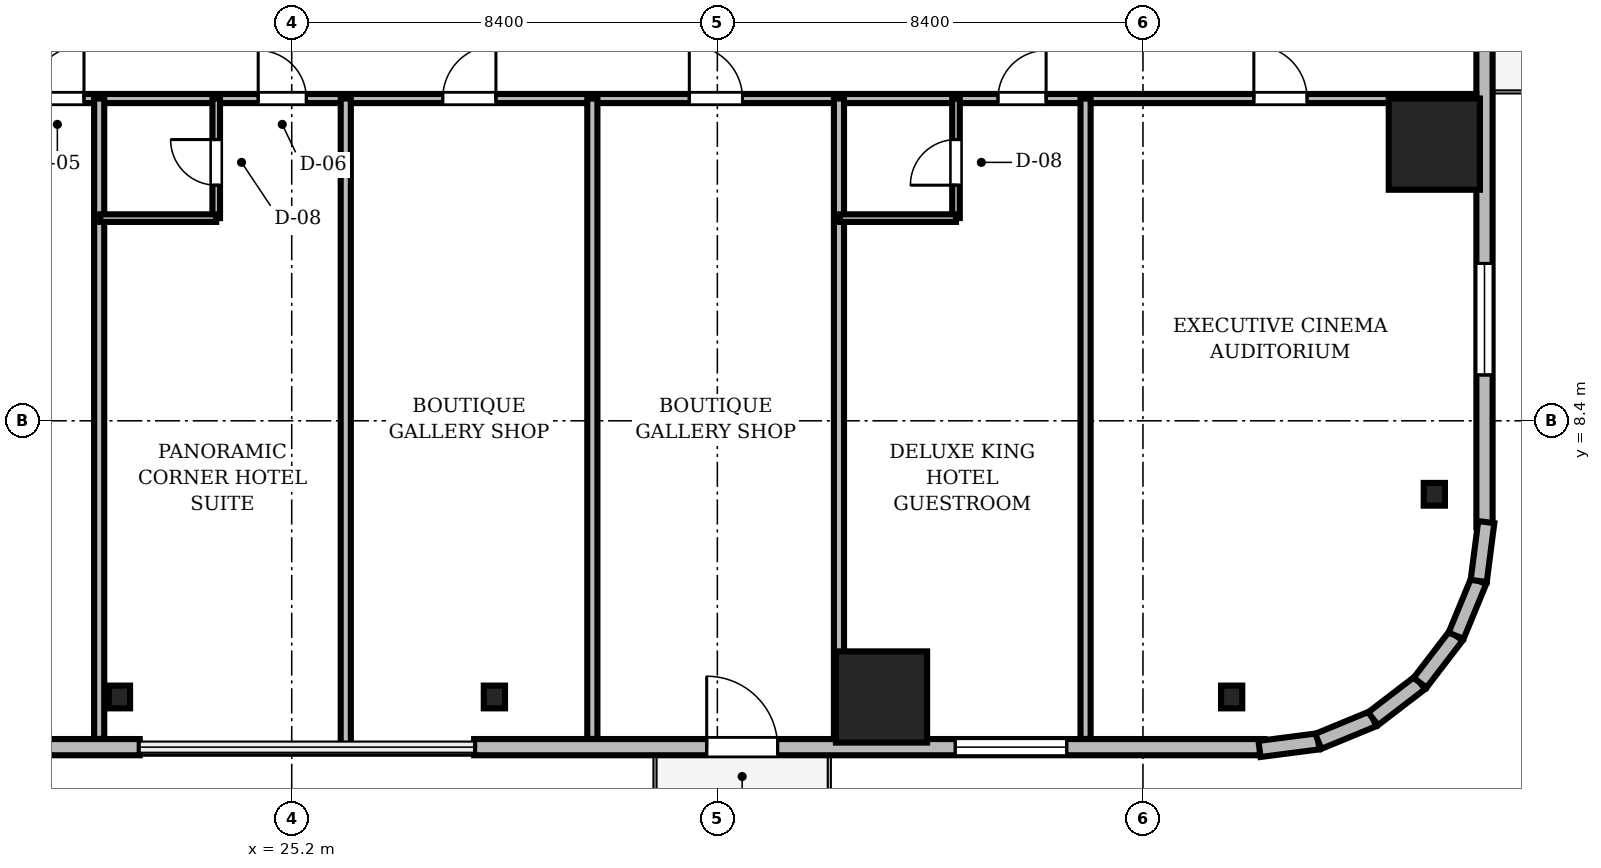
"""IFC4 building model, lengths in metres.
Left out: names, types, materials, properties, quantities, classifications, styles, units other than length and angle.
Written with IfcOpenShell. Run it as: python <this file> out.ifc"""

import sys

from ifc_helpers import new_model, si_unit, direction, frame, frame_2d, origin, origin_2d, place, context, subcontext, project, spatial, rectangle, i_section, extrude, source, transform, mapped, element, fill, save


model = new_model("IFC4")
c1 = context("Model", 3, precision=1e-05, world=origin(), true_north=direction((0.0, 1.0)))
c2 = subcontext(c1, "Body", "Model", "MODEL_VIEW")
j1 = project(units=[si_unit("LENGTHUNIT", "METRE"), si_unit("PLANEANGLEUNIT", "RADIAN")], contexts=[c1])
p1 = place(None, origin())
s1 = spatial("IfcSite", under=j1, at=p1, CompositionType="ELEMENT")
p2 = place(p1, origin())
s2 = spatial("IfcBuilding", under=s1, at=p2, CompositionType="ELEMENT")
p3 = place(p2, frame((0.0, 0.0, 45.85)))
s3 = spatial("IfcBuildingStorey", under=s2, at=p3, CompositionType="ELEMENT", Elevation=45.85)
m1 = source(origin(), c2, "Body", "SweptSolid", [
    extrude(rectangle(XDim=1.8, YDim=1.8, at=origin_2d()), origin(), (0.0, 0.0, 1.0), 3.41),
])
for number, where, z_axis, x_axis in (
    (1, (36.84, 2.95, 0.0), (0.0, 0.0, 1.0), (1.0, 0.0, 0.0)),
    (2, (47.75, 13.86, 0.0), (0.0, 0.0, 1.0), (1.0, 0.0, 0.0)),
):
    element("IfcColumn", number, at=place(p3, frame(where, z_axis=z_axis, x_axis=x_axis)), inside=s3, PredefinedType="COLUMN", context=c2, shape_type="MappedRepresentation", body=[
        mapped(m1, transform((0.0, 0.0, 0.0), scale=1.0)),
    ])
m2 = source(origin(), c2, "Body", "SweptSolid", [
    extrude(i_section(OverallWidth=0.419, OverallDepth=0.449, WebThickness=0.031, FlangeThickness=0.048, FilletRadius=0.015, at=origin_2d()), origin(), (0.0, 0.0, 1.0), 3.41),
])
for number, where, z_axis, x_axis in (
    (3, (21.8, 2.95, 0.0), (0.0, 0.0, 1.0), (1.0, 0.0, 0.0)),
    (4, (29.2, 2.95, 0.0), (0.0, 0.0, 1.0), (1.0, 0.0, 0.0)),
    (5, (43.75, 2.95, 0.0), (0.0, 0.0, 1.0), (1.0, 0.0, 0.0)),
    (6, (47.75, 6.95, 0.0), (0.0, 0.0, 1.0), (1.0, 0.0, 0.0)),
):
    element("IfcColumn", number, at=place(p3, frame(where, z_axis=z_axis, x_axis=x_axis)), inside=s3, PredefinedType="COLUMN", context=c2, shape_type="MappedRepresentation", body=[
        mapped(m2, transform((0.0, 0.0, 0.0), scale=1.0)),
    ])
m3 = source(origin(), c2, "Body", "SweptSolid", [
    extrude(rectangle(XDim=15.6, YDim=0.32, at=frame_2d((7.8, 0.0))), origin(), (0.0, 0.0, 1.0), 3.41),
])
p4 = place(p3, frame((6.6, 1.96, 0.0), z_axis=(0.0, 0.0, 1.0), x_axis=(1.0, 0.0, 0.0)))
e7 = element("IfcWall", 7, at=p4, inside=s3, PredefinedType="SOLIDWALL", context=c2, shape_type="MappedRepresentation", body=[
    mapped(m3, transform((0.0, 0.0, 0.0), scale=1.0)),
])
m4 = source(origin(), c2, "Body", "SweptSolid", [
    extrude(rectangle(XDim=2.2, YDim=2.4, at=frame_2d((1.1, 1.2))), frame((0.0, 0.17, 0.0), z_axis=(0.0, -1.0, 0.0), x_axis=(1.0, 0.0, 0.0)), (0.0, 0.0, 1.0), 0.34),
])
p5 = place(p4, frame((3.005, 0.0, 0.72)))
e8 = element("IfcOpeningElement", 8, at=p5, cuts=e7, PredefinedType="OPENING", context=c2, shape_type="MappedRepresentation", body=[
    mapped(m4, transform((0.0, 0.0, 0.0), scale=1.0)),
])
p6 = place(p3, frame((28.8, 1.96, 0.0), z_axis=(0.0, 0.0, 1.0), x_axis=(1.0, 0.0, 0.0)))
e9 = element("IfcWall", 9, at=p6, inside=s3, PredefinedType="SOLIDWALL", context=c2, shape_type="MappedRepresentation", body=[
    mapped(m3, transform((0.0, 0.0, 0.0), scale=1.0)),
])
m5 = source(origin(), c2, "Body", "SweptSolid", [
    extrude(rectangle(XDim=1.4, YDim=2.3, at=frame_2d((0.7, 1.15))), frame((0.0, 0.17, 0.0), z_axis=(0.0, -1.0, 0.0), x_axis=(1.0, 0.0, 0.0)), (0.0, 0.0, 1.0), 0.34),
])
p7 = place(p6, frame((4.59, 0.0, 0.0)))
e10 = element("IfcOpeningElement", 10, at=p7, cuts=e9, PredefinedType="OPENING", context=c2, shape_type="MappedRepresentation", body=[
    mapped(m5, transform((0.0, 0.0, 0.0), scale=1.0)),
])
p8 = place(p6, frame((9.495, 0.0, 0.72)))
e11 = element("IfcOpeningElement", 11, at=p8, cuts=e9, PredefinedType="OPENING", context=c2, shape_type="MappedRepresentation", body=[
    mapped(m4, transform((0.0, 0.0, 0.0), scale=1.0)),
])
p9 = place(p3, frame((48.74, 6.3, 0.0), z_axis=(0.0, 0.0, 1.0), x_axis=(0.0, 1.0, 0.0)))
e12 = element("IfcWall", 12, at=p9, inside=s3, PredefinedType="SOLIDWALL", context=c2, shape_type="MappedRepresentation", body=[
    mapped(m3, transform((0.0, 0.0, 0.0), scale=1.0)),
])
p10 = place(p9, frame((9.61, 0.0, 0.0)))
e13 = element("IfcOpeningElement", 13, at=p10, cuts=e12, PredefinedType="OPENING", context=c2, shape_type="MappedRepresentation", body=[
    mapped(m5, transform((0.0, 0.0, 0.0), scale=1.0)),
])
p11 = place(p9, frame((3.005, 0.0, 0.72)))
e14 = element("IfcOpeningElement", 14, at=p11, cuts=e12, PredefinedType="OPENING", context=c2, shape_type="MappedRepresentation", body=[
    mapped(m4, transform((0.0, 0.0, 0.0), scale=1.0)),
])
m6 = source(origin(), c2, "Body", "SweptSolid", [
    extrude(rectangle(XDim=1.17, YDim=0.32, at=frame_2d((0.585, 0.0))), origin(), (0.0, 0.0, 1.0), 3.41),
])
p12 = place(p3, frame((44.3, 1.925, 0.0), z_axis=(0.0, 0.0, 1.0), x_axis=(0.991762485493, 0.128090485085, 0.0)))
e15 = element("IfcWall", 15, at=p12, inside=s3, PredefinedType="SOLIDWALL", context=c2, shape_type="MappedRepresentation", body=[
    mapped(m6, transform((0.0, 0.0, 0.0), scale=1.0)),
])
m7 = source(origin(), c2, "Body", "SweptSolid", [
    extrude(rectangle(XDim=1.169, YDim=0.32, at=frame_2d((0.585, 0.0))), origin(), (0.0, 0.0, 1.0), 3.41),
])
p13 = place(p3, frame((45.46, 2.074, 0.0), z_axis=(0.0, 0.0, 1.0), x_axis=(0.924479075121, 0.381232789334, 0.0)))
e16 = element("IfcWall", 16, at=p13, inside=s3, PredefinedType="SOLIDWALL", context=c2, shape_type="MappedRepresentation", body=[
    mapped(m7, transform((0.0, 0.0, 0.0), scale=1.0)),
])
m8 = source(origin(), c2, "Body", "SweptSolid", [
    extrude(rectangle(XDim=1.169, YDim=0.32, at=frame_2d((0.584, 0.0))), origin(), (0.0, 0.0, 1.0), 3.41),
])
p14 = place(p3, frame((46.541, 2.52, 0.0), z_axis=(0.0, 0.0, 1.0), x_axis=(0.793663520347, 0.608356981114, 0.0)))
e17 = element("IfcWall", 17, at=p14, inside=s3, PredefinedType="SOLIDWALL", context=c2, shape_type="MappedRepresentation", body=[
    mapped(m8, transform((0.0, 0.0, 0.0), scale=1.0)),
])
m9 = source(origin(), c2, "Body", "SweptSolid", [
    extrude(rectangle(XDim=1.169, YDim=0.32, at=frame_2d((0.584, 0.0))), origin(), (0.0, 0.0, 1.0), 3.41),
])
for number, where, z_axis, x_axis in (
    (18, (47.469, 3.231, 0.0), (0.0, 0.0, 1.0), (0.608, 0.794, 0.0)),
    (19, (48.18, 4.159, 0.0), (0.0, 0.0, 1.0), (0.381, 0.925, 0.0)),
):
    element("IfcWall", number, at=place(p3, frame(where, z_axis=z_axis, x_axis=x_axis)), inside=s3, PredefinedType="SOLIDWALL", context=c2, shape_type="MappedRepresentation", body=[
        mapped(m9, transform((0.0, 0.0, 0.0), scale=1.0)),
    ])
m10 = source(origin(), c2, "Body", "SweptSolid", [
    extrude(rectangle(XDim=1.171, YDim=0.32, at=frame_2d((0.585, 0.0))), origin(), (0.0, 0.0, 1.0), 3.41),
])
p15 = place(p3, frame((48.625, 5.24, 0.0), z_axis=(0.0, 0.0, 1.0), x_axis=(0.128269133229, 0.991739395941, 0.0)))
e20 = element("IfcWall", 20, at=p15, inside=s3, PredefinedType="SOLIDWALL", context=c2, shape_type="MappedRepresentation", body=[
    mapped(m10, transform((0.0, 0.0, 0.0), scale=1.0)),
])
m11 = source(origin(), c2, "Body", "SweptSolid", [
    extrude(rectangle(XDim=46.156, YDim=0.18, at=frame_2d((23.078, 0.0))), origin(), (0.0, 0.0, 1.0), 2.652),
])
p16 = place(p3, frame((2.422, 14.76, 0.0), z_axis=(0.0, 0.0, 1.0), x_axis=(1.0, 0.0, 0.0)))
e21 = element("IfcWall", 21, at=p16, inside=s3, PredefinedType="PARTITIONING", context=c2, shape_type="MappedRepresentation", body=[
    mapped(m11, transform((0.0, 0.0, 0.0), scale=1.0)),
])
m12 = source(origin(), c2, "Body", "SweptSolid", [
    extrude(rectangle(XDim=1.05, YDim=2.2, at=frame_2d((0.525, 1.1))), frame((0.0, 0.1, 0.0), z_axis=(0.0, -1.0, 0.0), x_axis=(1.0, 0.0, 0.0)), (0.0, 0.0, 1.0), 0.2),
])
p17 = place(p16, frame((17.628, 0.0, 0.0)))
e22 = element("IfcOpeningElement", 22, at=p17, cuts=e21, PredefinedType="OPENING", context=c2, shape_type="MappedRepresentation", body=[
    mapped(m12, transform((0.0, 0.0, 0.0), scale=1.0)),
])
m13 = source(origin(), c2, "Body", "SweptSolid", [
    extrude(rectangle(XDim=0.95, YDim=2.15, at=frame_2d((0.475, 1.075))), frame((0.0, 0.1, 0.0), z_axis=(0.0, -1.0, 0.0), x_axis=(1.0, 0.0, 0.0)), (0.0, 0.0, 1.0), 0.2),
])
p18 = place(p16, frame((22.116, 0.0, 0.0)))
e23 = element("IfcOpeningElement", 23, at=p18, cuts=e21, PredefinedType="OPENING", context=c2, shape_type="MappedRepresentation", body=[
    mapped(m13, transform((0.0, 0.0, 0.0), scale=1.0)),
])
p19 = place(p16, frame((25.758, 0.0, 0.0)))
e24 = element("IfcOpeningElement", 24, at=p19, cuts=e21, PredefinedType="OPENING", context=c2, shape_type="MappedRepresentation", body=[
    mapped(m12, transform((0.0, 0.0, 0.0), scale=1.0)),
])
p20 = place(p16, frame((30.625, 0.0, 0.0)))
e25 = element("IfcOpeningElement", 25, at=p20, cuts=e21, PredefinedType="OPENING", context=c2, shape_type="MappedRepresentation", body=[
    mapped(m12, transform((0.0, 0.0, 0.0), scale=1.0)),
])
p21 = place(p16, frame((36.716, 0.0, 0.0)))
e26 = element("IfcOpeningElement", 26, at=p21, cuts=e21, PredefinedType="OPENING", context=c2, shape_type="MappedRepresentation", body=[
    mapped(m13, transform((0.0, 0.0, 0.0), scale=1.0)),
])
p22 = place(p16, frame((41.766, 0.0, 0.0)))
e27 = element("IfcOpeningElement", 27, at=p22, cuts=e21, PredefinedType="OPENING", context=c2, shape_type="MappedRepresentation", body=[
    mapped(m12, transform((0.0, 0.0, 0.0), scale=1.0)),
])
m14 = source(origin(), c2, "Body", "SweptSolid", [
    extrude(rectangle(XDim=2.36, YDim=0.15, at=frame_2d((1.18, 0.0))), origin(), (0.0, 0.0, 1.0), 3.41),
])
p23 = place(p3, frame((23.71, 12.4, 0.0), z_axis=(0.0, 0.0, 1.0), x_axis=(0.0, 1.0, 0.0)))
e28 = element("IfcWall", 28, at=p23, inside=s3, PredefinedType="PARTITIONING", context=c2, shape_type="MappedRepresentation", body=[
    mapped(m14, transform((0.0, 0.0, 0.0), scale=1.0)),
])
m15 = source(origin(), c2, "Body", "SweptSolid", [
    extrude(rectangle(XDim=0.9, YDim=2.1, at=frame_2d((0.45, 1.05))), frame((0.0, 0.085, 0.0), z_axis=(0.0, -1.0, 0.0), x_axis=(1.0, 0.0, 0.0)), (0.0, 0.0, 1.0), 0.17),
])
p24 = place(p23, frame((0.65, 0.0, 0.0)))
e29 = element("IfcOpeningElement", 29, at=p24, cuts=e28, PredefinedType="OPENING", context=c2, shape_type="MappedRepresentation", body=[
    mapped(m15, transform((0.0, 0.0, 0.0), scale=1.0)),
])
p25 = place(p3, frame((38.31, 12.4, 0.0), z_axis=(0.0, 0.0, 1.0), x_axis=(0.0, 1.0, 0.0)))
e30 = element("IfcWall", 30, at=p25, inside=s3, PredefinedType="PARTITIONING", context=c2, shape_type="MappedRepresentation", body=[
    mapped(m14, transform((0.0, 0.0, 0.0), scale=1.0)),
])
p26 = place(p25, frame((0.65, 0.0, 0.0)))
e31 = element("IfcOpeningElement", 31, at=p26, cuts=e30, PredefinedType="OPENING", context=c2, shape_type="MappedRepresentation", body=[
    mapped(m15, transform((0.0, 0.0, 0.0), scale=1.0)),
])
m16 = source(origin(), c2, "Body", "SweptSolid", [
    extrude(rectangle(XDim=12.638, YDim=0.2, at=frame_2d((6.319, 0.0))), origin(), (0.0, 0.0, 1.0), 2.652),
])
p27 = place(p3, frame((21.4, 2.122, 0.0), z_axis=(0.0, 0.0, 1.0), x_axis=(0.0, 1.0, 0.0)))
e32 = element("IfcWall", 32, at=p27, inside=s3, PredefinedType="PARTITIONING", context=c2, shape_type="MappedRepresentation", body=[
    mapped(m16, transform((0.0, 0.0, 0.0), scale=1.0)),
])
m17 = source(origin(), c2, "Body", "SweptSolid", [
    extrude(rectangle(XDim=12.83, YDim=0.2, at=frame_2d((6.415, 0.0))), origin(), (0.0, 0.0, 1.0), 2.652),
])
p28 = place(p3, frame((26.267, 1.93, 0.0), z_axis=(0.0, 0.0, 1.0), x_axis=(0.0, 1.0, 0.0)))
e33 = element("IfcWall", 33, at=p28, inside=s3, PredefinedType="PARTITIONING", context=c2, shape_type="MappedRepresentation", body=[
    mapped(m17, transform((0.0, 0.0, 0.0), scale=1.0)),
])
for number, where, z_axis, x_axis in (
    (34, (31.133, 2.122, 0.0), (0.0, 0.0, 1.0), (0.0, 1.0, 0.0)),
    (35, (36.0, 2.122, 0.0), (0.0, 0.0, 1.0), (0.0, 1.0, 0.0)),
    (36, (40.867, 2.122, 0.0), (0.0, 0.0, 1.0), (0.0, 1.0, 0.0)),
):
    element("IfcWall", number, at=place(p3, frame(where, z_axis=z_axis, x_axis=x_axis)), inside=s3, PredefinedType="PARTITIONING", context=c2, shape_type="MappedRepresentation", body=[
        mapped(m16, transform((0.0, 0.0, 0.0), scale=1.0)),
    ])
m18 = source(origin(), c2, "Body", "SweptSolid", [
    extrude(rectangle(XDim=2.29, YDim=0.15, at=frame_2d((1.145, 0.0))), origin(), (0.0, 0.0, 1.0), 3.41),
])
for number, where, z_axis, x_axis in (
    (37, (21.42, 12.4, 0.0), (0.0, 0.0, 1.0), (1.0, 0.0, 0.0)),
    (38, (36.02, 12.4, 0.0), (0.0, 0.0, 1.0), (1.0, 0.0, 0.0)),
):
    element("IfcWall", number, at=place(p3, frame(where, z_axis=z_axis, x_axis=x_axis)), inside=s3, PredefinedType="PARTITIONING", context=c2, shape_type="MappedRepresentation", body=[
        mapped(m18, transform((0.0, 0.0, 0.0), scale=1.0)),
    ])
m19 = source(origin(), c2, "Body", "SweptSolid", [
    extrude(rectangle(XDim=1.4, YDim=2.3, at=frame_2d((0.7, 1.15))), frame((0.0, 0.025, 0.0), z_axis=(0.0, -1.0, 0.0), x_axis=(1.0, 0.0, 0.0)), (0.0, 0.0, 1.0), 0.05),
])
p29 = place(p7, frame((1.4, 0.0, 0.0), z_axis=(0.0, 0.0, 1.0), x_axis=(-1.0, 0.0, 0.0)))
e39 = element("IfcDoor", 39, at=p29, inside=s3, OperationType="DOUBLE_DOOR_SLIDING", PredefinedType="DOOR", context=c2, shape_type="MappedRepresentation", body=[
    mapped(m19, transform((0.0, 0.0, 0.0), scale=1.0)),
])
fill(e10, e39)
m20 = source(origin(), c2, "Body", "SweptSolid", [
    extrude(rectangle(XDim=2.2, YDim=2.4, at=frame_2d((1.1, 1.2))), frame((0.0, 0.03, 0.0), z_axis=(0.0, -1.0, 0.0), x_axis=(1.0, 0.0, 0.0)), (0.0, 0.0, 1.0), 0.06),
])
p30 = place(p8, origin())
e40 = element("IfcWindow", 40, at=p30, inside=s3, PartitioningType="SINGLE_PANEL", PredefinedType="WINDOW", context=c2, shape_type="MappedRepresentation", body=[
    mapped(m20, transform((0.0, 0.0, 0.0), scale=1.0)),
])
fill(e11, e40)
p31 = place(p11, origin())
e41 = element("IfcWindow", 41, at=p31, inside=s3, PartitioningType="SINGLE_PANEL", PredefinedType="WINDOW", context=c2, shape_type="MappedRepresentation", body=[
    mapped(m20, transform((0.0, 0.0, 0.0), scale=1.0)),
])
fill(e14, e41)
m21 = source(origin(), c2, "Body", "SweptSolid", [
    extrude(rectangle(XDim=1.05, YDim=2.2, at=frame_2d((0.525, 1.1))), frame((0.0, 0.025, 0.0), z_axis=(0.0, -1.0, 0.0), x_axis=(1.0, 0.0, 0.0)), (0.0, 0.0, 1.0), 0.05),
])
p32 = place(p17, origin())
e42 = element("IfcDoor", 42, at=p32, inside=s3, OperationType="SINGLE_SWING_RIGHT", PredefinedType="DOOR", context=c2, shape_type="MappedRepresentation", body=[
    mapped(m21, transform((0.0, 0.0, 0.0), scale=1.0)),
])
fill(e22, e42)
m22 = source(origin(), c2, "Body", "SweptSolid", [
    extrude(rectangle(XDim=0.95, YDim=2.15, at=frame_2d((0.475, 1.075))), frame((0.0, 0.025, 0.0), z_axis=(0.0, -1.0, 0.0), x_axis=(1.0, 0.0, 0.0)), (0.0, 0.0, 1.0), 0.05),
])
p33 = place(p18, origin())
e43 = element("IfcDoor", 43, at=p33, inside=s3, OperationType="SINGLE_SWING_LEFT", PredefinedType="DOOR", context=c2, shape_type="MappedRepresentation", body=[
    mapped(m22, transform((0.0, 0.0, 0.0), scale=1.0)),
])
fill(e23, e43)
p34 = place(p19, origin())
e44 = element("IfcDoor", 44, at=p34, inside=s3, OperationType="SINGLE_SWING_RIGHT", PredefinedType="DOOR", context=c2, shape_type="MappedRepresentation", body=[
    mapped(m21, transform((0.0, 0.0, 0.0), scale=1.0)),
])
fill(e24, e44)
p35 = place(p20, origin())
e45 = element("IfcDoor", 45, at=p35, inside=s3, OperationType="SINGLE_SWING_LEFT", PredefinedType="DOOR", context=c2, shape_type="MappedRepresentation", body=[
    mapped(m21, transform((0.0, 0.0, 0.0), scale=1.0)),
])
fill(e25, e45)
p36 = place(p21, origin())
e46 = element("IfcDoor", 46, at=p36, inside=s3, OperationType="SINGLE_SWING_RIGHT", PredefinedType="DOOR", context=c2, shape_type="MappedRepresentation", body=[
    mapped(m22, transform((0.0, 0.0, 0.0), scale=1.0)),
])
fill(e26, e46)
p37 = place(p22, origin())
e47 = element("IfcDoor", 47, at=p37, inside=s3, OperationType="SINGLE_SWING_LEFT", PredefinedType="DOOR", context=c2, shape_type="MappedRepresentation", body=[
    mapped(m21, transform((0.0, 0.0, 0.0), scale=1.0)),
])
fill(e27, e47)
m23 = source(origin(), c2, "Body", "SweptSolid", [
    extrude(rectangle(XDim=0.9, YDim=2.1, at=frame_2d((0.45, 1.05))), frame((0.0, 0.025, 0.0), z_axis=(0.0, -1.0, 0.0), x_axis=(1.0, 0.0, 0.0)), (0.0, 0.0, 1.0), 0.05),
])
p38 = place(p24, origin())
e48 = element("IfcDoor", 48, at=p38, inside=s3, OperationType="SINGLE_SWING_RIGHT", PredefinedType="DOOR", context=c2, shape_type="MappedRepresentation", body=[
    mapped(m23, transform((0.0, 0.0, 0.0), scale=1.0)),
])
fill(e29, e48)
p39 = place(p26, origin())
e49 = element("IfcDoor", 49, at=p39, inside=s3, OperationType="SINGLE_SWING_LEFT", PredefinedType="DOOR", context=c2, shape_type="MappedRepresentation", body=[
    mapped(m23, transform((0.0, 0.0, 0.0), scale=1.0)),
])
fill(e31, e49)
save(model, sys.argv[1])
